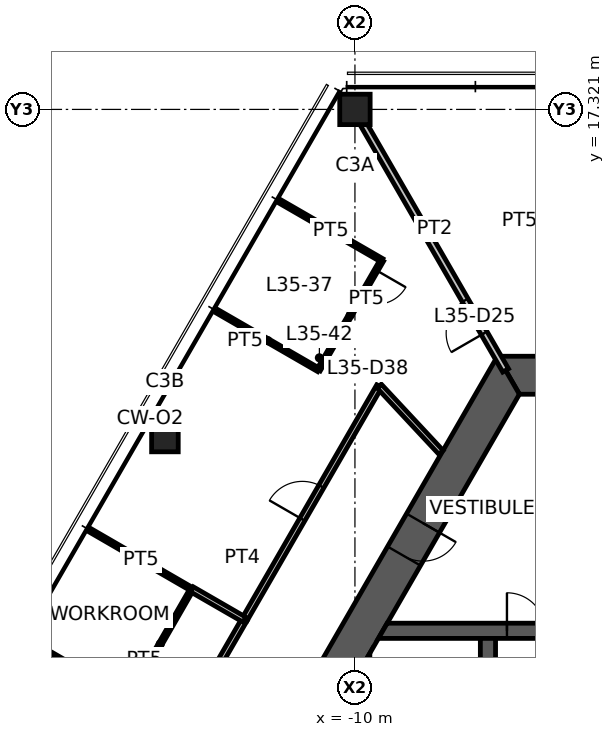
"""IFC4 building model, lengths in metres.
Left out: names, types, materials, properties, quantities, classifications, styles, units other than length and angle.
Written with IfcOpenShell. Run it as: python <this file> out.ifc"""

import sys

from ifc_helpers import new_model, si_unit, direction, frame, frame_2d, origin, origin_2d, place, context, subcontext, project, spatial, polyline, rectangle, hollow_rectangle, outline, extrude, element, fill, save


model = new_model("IFC4")
c1 = context("Model", 3, precision=1e-05, world=origin(), true_north=direction((0.0, 1.0)))
c2 = subcontext(c1, "Body", "Model", "MODEL_VIEW")
j1 = project(units=[si_unit("LENGTHUNIT", "METRE"), si_unit("PLANEANGLEUNIT", "RADIAN")], contexts=[c1])
p1 = place(None, origin())
s1 = spatial("IfcSite", under=j1, at=p1, CompositionType="ELEMENT")
p2 = place(p1, origin())
s2 = spatial("IfcBuilding", under=s1, at=p2, CompositionType="ELEMENT")
p3 = place(p2, frame((0.0, 0.0, 140.9)))
s3 = spatial("IfcBuildingStorey", under=s2, at=p3, CompositionType="ELEMENT", Elevation=140.9)
p4 = place(p3, frame((-10.0, 17.321, 0.0), z_axis=(0.0, 0.0, 1.0), x_axis=(1.0, 0.0, 0.0)))
e1 = element("IfcColumn", 1, at=p4, inside=s3, PredefinedType="COLUMN", context=c2, shape_type="SweptSolid", body=[
    extrude(hollow_rectangle(XDim=0.8, YDim=0.8, WallThickness=0.045, at=origin_2d()), origin(), (0.0, 0.0, 1.0), 3.9),
])
p5 = place(p3, frame((-15.0, 8.66, 0.0), z_axis=(0.0, 0.0, 1.0), x_axis=(1.0, 0.0, 0.0)))
e2 = element("IfcColumn", 2, at=p5, inside=s3, PredefinedType="COLUMN", context=c2, shape_type="SweptSolid", body=[
    extrude(hollow_rectangle(XDim=0.7, YDim=0.7, WallThickness=0.036, at=origin_2d()), origin(), (0.0, 0.0, 1.0), 3.9),
])
p6 = place(p3, frame((5.961, 10.325, 0.0), z_axis=(0.0, 0.0, 1.0), x_axis=(-1.0, 0.0, 0.0)))
e3 = element("IfcWall", 3, at=p6, inside=s3, PredefinedType="SHEAR", context=c2, shape_type="SweptSolid", body=[
    extrude(outline(polyline([(-0.289, -0.5), (4.636, -0.5), (5.536, -0.5), (6.386, -0.5), (7.286, -0.5), (12.211, -0.5), (11.634, 0.5), (7.286, 0.5), (6.386, 0.5), (5.536, 0.5), (4.636, 0.5), (0.289, 0.5), (-0.289, -0.5)])), origin(), (0.0, 0.0, 1.0), 3.9),
])
p7 = place(p6, frame((6.386, 0.0, 0.0)))
e4 = element("IfcOpeningElement", 4, at=p7, cuts=e3, PredefinedType="OPENING", context=c2, shape_type="SweptSolid", body=[
    extrude(rectangle(XDim=0.9, YDim=2.1, at=frame_2d((0.45, 1.05))), frame((0.0, 0.51, 0.0), z_axis=(0.0, -1.0, 0.0), x_axis=(1.0, 0.0, 0.0)), (0.0, 0.0, 1.0), 1.02),
])
p8 = place(p6, frame((4.636, 0.0, 0.0)))
e5 = element("IfcOpeningElement", 5, at=p8, cuts=e3, PredefinedType="OPENING", context=c2, shape_type="SweptSolid", body=[
    extrude(rectangle(XDim=0.9, YDim=2.1, at=frame_2d((0.45, 1.05))), frame((0.0, 0.51, 0.0), z_axis=(0.0, -1.0, 0.0), x_axis=(1.0, 0.0, 0.0)), (0.0, 0.0, 1.0), 1.02),
])
p9 = place(p3, frame((-5.961, 10.325, 0.0), z_axis=(0.0, 0.0, 1.0), x_axis=(-0.500004296715, -0.866022923061, 0.0)))
e6 = element("IfcWall", 6, at=p9, inside=s3, PredefinedType="SHEAR", context=c2, shape_type="SweptSolid", body=[
    extrude(outline(polyline([(-0.289, -0.5), (4.494, -0.5), (5.494, -0.5), (12.211, -0.5), (11.634, 0.5), (5.494, 0.5), (4.494, 0.5), (0.289, 0.5), (-0.289, -0.5)])), origin(), (0.0, 0.0, 1.0), 3.9),
])
p10 = place(p9, frame((4.494, 0.0, 0.0)))
e7 = element("IfcOpeningElement", 7, at=p10, cuts=e6, PredefinedType="OPENING", context=c2, shape_type="SweptSolid", body=[
    extrude(rectangle(XDim=1.0, YDim=2.1, at=frame_2d((0.5, 1.05))), frame((0.0, 0.51, 0.0), z_axis=(0.0, -1.0, 0.0), x_axis=(1.0, 0.0, 0.0)), (0.0, 0.0, 1.0), 1.02),
])
p11 = place(p3, frame((-9.266, 3.6, 0.0), z_axis=(0.0, 0.0, 1.0), x_axis=(1.0, 0.0, 0.0)))
e8 = element("IfcWall", 8, at=p11, inside=s3, PredefinedType="SHEAR", context=c2, shape_type="SweptSolid", body=[
    extrude(outline(polyline([(-0.115, -0.2), (3.266, -0.2), (4.266, -0.2), (5.667, -0.2), (6.767, -0.2), (7.866, -0.2), (7.866, 0.2), (6.767, 0.2), (5.667, 0.2), (4.266, 0.2), (3.266, 0.2), (0.115, 0.2), (-0.115, -0.2)])), origin(), (0.0, 0.0, 1.0), 3.9),
])
p12 = place(p11, frame((3.266, 0.0, 0.0)))
e9 = element("IfcOpeningElement", 9, at=p12, cuts=e8, PredefinedType="OPENING", context=c2, shape_type="SweptSolid", body=[
    extrude(rectangle(XDim=1.0, YDim=2.1, at=frame_2d((0.5, 1.05))), frame((0.0, 0.21, 0.0), z_axis=(0.0, -1.0, 0.0), x_axis=(1.0, 0.0, 0.0)), (0.0, 0.0, 1.0), 0.42),
])
p13 = place(p11, frame((5.667, 0.0, 0.0)))
e10 = element("IfcOpeningElement", 10, at=p13, cuts=e8, PredefinedType="OPENING", context=c2, shape_type="SweptSolid", body=[
    extrude(rectangle(XDim=1.1, YDim=2.1, at=frame_2d((0.55, 1.05))), frame((0.0, 0.21, 0.0), z_axis=(0.0, -1.0, 0.0), x_axis=(1.0, 0.0, 0.0)), (0.0, 0.0, 1.0), 0.42),
])
p14 = place(p3, frame((-6.5, -3.4, 0.0), z_axis=(0.0, 0.0, 1.0), x_axis=(0.0, 1.0, 0.0)))
e11 = element("IfcWall", 11, at=p14, inside=s3, PredefinedType="SHEAR", context=c2, shape_type="SweptSolid", body=[
    extrude(rectangle(XDim=6.8, YDim=0.4, at=frame_2d((3.4, 0.0))), origin(), (0.0, 0.0, 1.0), 3.9),
])
p15 = place(p14, frame((0.1, 0.0, 0.0)))
e12 = element("IfcOpeningElement", 12, at=p15, cuts=e11, PredefinedType="OPENING", context=c2, shape_type="SweptSolid", body=[
    extrude(rectangle(XDim=1.0, YDim=2.1, at=frame_2d((0.5, 1.05))), frame((0.0, 0.21, 0.0), z_axis=(0.0, -1.0, 0.0), x_axis=(1.0, 0.0, 0.0)), (0.0, 0.0, 1.0), 0.42),
])
p16 = place(p3, frame((-9.808, -2.662, 0.0), z_axis=(0.0, 0.0, 1.0), x_axis=(0.0, 1.0, 0.0)))
e13 = element("IfcWall", 13, at=p16, inside=s3, PredefinedType="SHEAR", context=c2, shape_type="SweptSolid", body=[
    extrude(outline(polyline([(-0.346, -0.2), (5.671, -0.2), (4.978, 0.2), (0.346, 0.2), (-0.346, -0.2)])), origin(), (0.0, 0.0, 1.0), 3.9),
])
p17 = place(p3, frame((-6.035, 10.453, 0.0), z_axis=(0.0, 0.0, 1.0), x_axis=(-0.499989830942, 0.866031274813, 0.0)))
e14 = element("IfcWall", 14, at=p17, inside=s3, PredefinedType="PARTITIONING", context=c2, shape_type="SweptSolid", body=[
    extrude(rectangle(XDim=7.93, YDim=0.175, at=frame_2d((3.965, 0.0))), origin(), (0.0, 0.0, 1.0), 3.05),
])
p18 = place(p17, frame((1.13, 0.0, 0.0)))
e15 = element("IfcOpeningElement", 15, at=p18, cuts=e14, PredefinedType="OPENING", context=c2, shape_type="SweptSolid", body=[
    extrude(rectangle(XDim=1.0, YDim=2.1, at=frame_2d((0.5, 1.05))), frame((0.0, 0.098, 0.0), z_axis=(0.0, -1.0, 0.0), x_axis=(1.0, 0.0, 0.0)), (0.0, 0.0, 1.0), 0.195),
])
p19 = place(p3, frame((-15.156, 0.0, 0.0), z_axis=(0.0, 0.0, 1.0), x_axis=(0.500014848696, 0.866016830716, 0.0)))
e16 = element("IfcWall", 16, at=p19, inside=s3, PredefinedType="PARTITIONING", context=c2, shape_type="SweptSolid", body=[
    extrude(rectangle(XDim=4.505, YDim=0.15, at=frame_2d((2.252, 0.0))), origin(), (0.0, 0.0, 1.0), 2.95),
])
p20 = place(p3, frame((-12.908, 3.893, 0.0), z_axis=(0.0, 0.0, 1.0), x_axis=(0.500006411147, 0.866021702275, 0.0)))
e17 = element("IfcWall", 17, at=p20, inside=s3, PredefinedType="PARTITIONING", context=c2, shape_type="SweptSolid", body=[
    extrude(rectangle(XDim=7.095, YDim=0.15, at=frame_2d((3.548, 0.0))), origin(), (0.0, 0.0, 1.0), 2.95),
])
p21 = place(p20, frame((3.047, 0.0, 0.0)))
e18 = element("IfcOpeningElement", 18, at=p21, cuts=e17, PredefinedType="OPENING", context=c2, shape_type="SweptSolid", body=[
    extrude(rectangle(XDim=1.0, YDim=2.1, at=frame_2d((0.5, 1.05))), frame((0.0, 0.085, 0.0), z_axis=(0.0, -1.0, 0.0), x_axis=(1.0, 0.0, 0.0)), (0.0, 0.0, 1.0), 0.17),
])
p22 = place(p3, frame((-9.36, 10.038, 0.0), z_axis=(0.0, 0.0, 1.0), x_axis=(0.681997114248, -0.731354863358, 0.0)))
e19 = element("IfcWall", 19, at=p22, inside=s3, PredefinedType="PARTITIONING", context=c2, shape_type="SweptSolid", body=[
    extrude(outline(polyline([(0.0, -0.075), (2.384, -0.075), (2.384, 0.0), (2.382, 0.075), (0.0, 0.075), (0.0, -0.075)])), origin(), (0.0, 0.0, 1.0), 2.95),
])
p23 = place(p3, frame((-11.98, 14.902, 0.0), z_axis=(0.0, 0.0, 1.0), x_axis=(0.866042875753, -0.499969736442, 0.0)))
e20 = element("IfcWall", 20, at=p23, inside=s3, PredefinedType="PARTITIONING", context=c2, shape_type="SweptSolid", body=[
    extrude(rectangle(XDim=3.105, YDim=0.1, at=frame_2d((1.553, 0.0))), origin(), (0.0, 0.0, 1.0), 2.95),
])
p24 = place(p3, frame((-10.956, 10.465, 0.0), z_axis=(0.0, 0.0, 1.0), x_axis=(-0.866044340336, 0.499967199496, 0.0)))
e21 = element("IfcWall", 21, at=p24, inside=s3, PredefinedType="PARTITIONING", context=c2, shape_type="SweptSolid", body=[
    extrude(rectangle(XDim=3.08, YDim=0.1, at=frame_2d((1.54, 0.0))), origin(), (0.0, 0.0, 1.0), 2.95),
])
p25 = place(p3, frame((-9.291, 13.349, 0.0), z_axis=(0.0, 0.0, 1.0), x_axis=(-0.500033344505, -0.86600615147, 0.0)))
e22 = element("IfcWall", 22, at=p25, inside=s3, PredefinedType="PARTITIONING", context=c2, shape_type="SweptSolid", body=[
    extrude(rectangle(XDim=3.331, YDim=0.1, at=frame_2d((1.666, 0.0))), origin(), (0.0, 0.0, 1.0), 2.95),
])
p26 = place(p25, frame((0.3, 0.0, 0.0)))
e23 = element("IfcOpeningElement", 23, at=p26, cuts=e22, PredefinedType="OPENING", context=c2, shape_type="SweptSolid", body=[
    extrude(rectangle(XDim=0.9, YDim=2.1, at=frame_2d((0.45, 1.05))), frame((0.0, 0.06, 0.0), z_axis=(0.0, -1.0, 0.0), x_axis=(1.0, 0.0, 0.0)), (0.0, 0.0, 1.0), 0.12),
])
p27 = place(p3, frame((-15.952, 1.811, 0.0), z_axis=(0.0, 0.0, 1.0), x_axis=(-0.866029832698, 0.499992328818, 0.0)))
e24 = element("IfcWall", 24, at=p27, inside=s3, PredefinedType="PARTITIONING", context=c2, shape_type="SweptSolid", body=[
    extrude(rectangle(XDim=3.08, YDim=0.1, at=frame_2d((1.54, 0.0))), origin(), (0.0, 0.0, 1.0), 2.95),
])
p28 = place(p3, frame((-14.291, 4.698, 0.0), z_axis=(0.0, 0.0, 1.0), x_axis=(-0.498780940327, -0.866728085138, 0.0)))
e25 = element("IfcWall", 25, at=p28, inside=s3, PredefinedType="PARTITIONING", context=c2, shape_type="SweptSolid", body=[
    extrude(rectangle(XDim=3.331, YDim=0.1, at=frame_2d((1.666, 0.0))), origin(), (0.0, 0.0, 1.0), 2.95),
])
p29 = place(p28, frame((2.131, 0.0, 0.0)))
e26 = element("IfcOpeningElement", 26, at=p29, cuts=e25, PredefinedType="OPENING", context=c2, shape_type="SweptSolid", body=[
    extrude(rectangle(XDim=0.9, YDim=2.1, at=frame_2d((0.45, 1.05))), frame((0.0, 0.06, 0.0), z_axis=(0.0, -1.0, 0.0), x_axis=(1.0, 0.0, 0.0)), (0.0, 0.0, 1.0), 0.12),
])
p30 = place(p3, frame((-16.976, 6.248, 0.0), z_axis=(0.0, 0.0, 1.0), x_axis=(0.865232439327, -0.501370946442, 0.0)))
e27 = element("IfcWall", 27, at=p30, inside=s3, PredefinedType="PARTITIONING", context=c2, shape_type="SweptSolid", body=[
    extrude(rectangle(XDim=3.105, YDim=0.1, at=frame_2d((1.553, 0.0))), origin(), (0.0, 0.0, 1.0), 2.95),
])
p31 = place(p3, frame((-14.289, 4.691, 0.0), z_axis=(0.0, 0.0, 1.0), x_axis=(0.865925490132, -0.500173015605, 0.0)))
e28 = element("IfcWall", 28, at=p31, inside=s3, PredefinedType="PARTITIONING", context=c2, shape_type="SweptSolid", body=[
    extrude(rectangle(XDim=1.595, YDim=0.15, at=frame_2d((0.797, 0.0))), origin(), (0.0, 0.0, 1.0), 2.95),
])
p32 = place(p10, origin())
e29 = element("IfcDoor", 29, at=p32, inside=s3, OperationType="SINGLE_SWING_LEFT", PredefinedType="DOOR", context=c2, shape_type="SweptSolid", body=[
    extrude(rectangle(XDim=1.0, YDim=2.1, at=frame_2d((0.5, 1.05))), frame((0.0, 0.025, 0.0), z_axis=(0.0, -1.0, 0.0), x_axis=(1.0, 0.0, 0.0)), (0.0, 0.0, 1.0), 0.05),
])
fill(e7, e29)
p33 = place(p12, origin())
e30 = element("IfcDoor", 30, at=p33, inside=s3, OperationType="SINGLE_SWING_LEFT", PredefinedType="DOOR", context=c2, shape_type="SweptSolid", body=[
    extrude(rectangle(XDim=1.0, YDim=2.1, at=frame_2d((0.5, 1.05))), frame((0.0, 0.025, 0.0), z_axis=(0.0, -1.0, 0.0), x_axis=(1.0, 0.0, 0.0)), (0.0, 0.0, 1.0), 0.05),
])
fill(e9, e30)
p34 = place(p18, origin())
e31 = element("IfcDoor", 31, at=p34, inside=s3, OperationType="SINGLE_SWING_LEFT", PredefinedType="DOOR", context=c2, shape_type="SweptSolid", body=[
    extrude(rectangle(XDim=1.0, YDim=2.1, at=frame_2d((0.5, 1.05))), frame((0.0, 0.025, 0.0), z_axis=(0.0, -1.0, 0.0), x_axis=(1.0, 0.0, 0.0)), (0.0, 0.0, 1.0), 0.05),
])
fill(e15, e31)
p35 = place(p21, origin())
e32 = element("IfcDoor", 32, at=p35, inside=s3, OperationType="SINGLE_SWING_LEFT", PredefinedType="DOOR", context=c2, shape_type="SweptSolid", body=[
    extrude(rectangle(XDim=1.0, YDim=2.1, at=frame_2d((0.5, 1.05))), frame((0.0, 0.025, 0.0), z_axis=(0.0, -1.0, 0.0), x_axis=(1.0, 0.0, 0.0)), (0.0, 0.0, 1.0), 0.05),
])
fill(e18, e32)
p36 = place(p26, origin())
e33 = element("IfcDoor", 33, at=p36, inside=s3, OperationType="SINGLE_SWING_LEFT", PredefinedType="DOOR", context=c2, shape_type="SweptSolid", body=[
    extrude(rectangle(XDim=0.9, YDim=2.1, at=frame_2d((0.45, 1.05))), frame((0.0, 0.025, 0.0), z_axis=(0.0, -1.0, 0.0), x_axis=(1.0, 0.0, 0.0)), (0.0, 0.0, 1.0), 0.05),
])
fill(e23, e33)
save(model, sys.argv[1])
